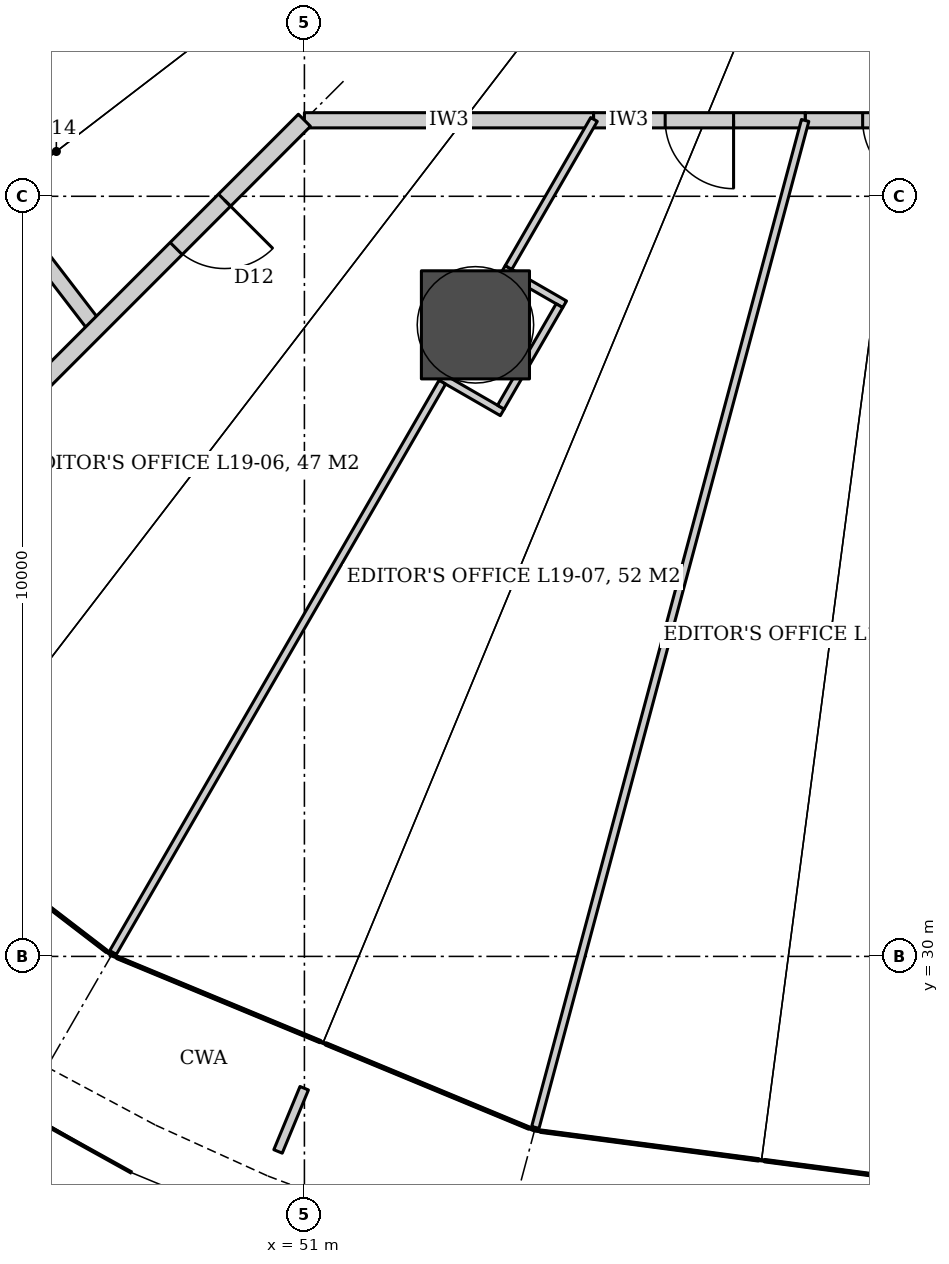
"""IFC4 building model, lengths in metres.
Left out: names, types, materials, properties, quantities, classifications, styles, units other than length and angle.
Written with IfcOpenShell. Run it as: python <this file> out.ifc"""

import sys

from ifc_helpers import new_model, si_unit, direction, frame, frame_2d, origin, origin_2d, place, context, subcontext, project, spatial, rectangle, hollow_circle, extrude, element, fill, save


model = new_model("IFC4")
c1 = context("Model", 3, precision=1e-05, world=origin(), true_north=direction((0.0, 1.0)))
c2 = subcontext(c1, "Body", "Model", "MODEL_VIEW")
j1 = project(units=[si_unit("LENGTHUNIT", "METRE"), si_unit("PLANEANGLEUNIT", "RADIAN")], contexts=[c1])
p1 = place(None, origin())
s1 = spatial("IfcSite", under=j1, at=p1, CompositionType="ELEMENT")
p2 = place(p1, origin())
s2 = spatial("IfcBuilding", under=s1, at=p2, CompositionType="ELEMENT")
p3 = place(p2, frame((0.0, 0.0, 80.6)))
s3 = spatial("IfcBuildingStorey", under=s2, at=p3, CompositionType="ELEMENT", Elevation=80.6)
p4 = place(p3, frame((53.25, 38.309, 0.0), z_axis=(0.0, 0.0, 1.0), x_axis=(1.0, 0.0, 0.0)))
e1 = element("IfcColumn", 1, at=p4, inside=s3, PredefinedType="COLUMN", context=c2, shape_type="SweptSolid", body=[
    extrude(hollow_circle(Radius=0.711, WallThickness=0.07, at=origin_2d()), origin(), (0.0, 0.0, 1.0), 4.2),
])
p5 = place(p3, frame((48.262, 38.262, 0.0), z_axis=(0.0, 0.0, 1.0), x_axis=(-0.60874374674, 0.79336690806, 0.0)))
e2 = element("IfcWall", 2, at=p5, inside=s3, PredefinedType="PARTITIONING", context=c2, shape_type="SweptSolid", body=[
    extrude(rectangle(XDim=4.333, YDim=0.2, at=frame_2d((2.167, 0.0))), origin(), (0.0, 0.0, 1.0), 3.04),
])
p6 = place(p5, frame((1.567, 0.0, 0.0)))
e3 = element("IfcOpeningElement", 3, at=p6, cuts=e2, PredefinedType="OPENING", context=c2, shape_type="SweptSolid", body=[
    extrude(rectangle(XDim=1.2, YDim=2.4, at=frame_2d((0.6, 1.2))), frame((0.0, 0.11, 0.0), z_axis=(0.0, -1.0, 0.0), x_axis=(1.0, 0.0, 0.0)), (0.0, 0.0, 1.0), 0.22),
])
p7 = place(p3, frame((60.0, 41.0, 0.0), z_axis=(0.0, 0.0, 1.0), x_axis=(-1.0, 0.0, 0.0)))
e4 = element("IfcWall", 4, at=p7, inside=s3, PredefinedType="PARTITIONING", context=c2, shape_type="SweptSolid", body=[
    extrude(rectangle(XDim=2.412, YDim=0.2, at=frame_2d((1.206, 0.0))), origin(), (0.0, 0.0, 1.0), 3.04),
])
p8 = place(p7, frame((0.756, 0.0, 0.0)))
e5 = element("IfcOpeningElement", 5, at=p8, cuts=e4, PredefinedType="OPENING", context=c2, shape_type="SweptSolid", body=[
    extrude(rectangle(XDim=0.9, YDim=2.4, at=frame_2d((0.45, 1.2))), frame((0.0, 0.11, 0.0), z_axis=(0.0, -1.0, 0.0), x_axis=(1.0, 0.0, 0.0)), (0.0, 0.0, 1.0), 0.22),
])
p9 = place(p3, frame((57.588, 41.0, 0.0), z_axis=(0.0, 0.0, 1.0), x_axis=(-1.0, 0.0, 0.0)))
e6 = element("IfcWall", 6, at=p9, inside=s3, PredefinedType="PARTITIONING", context=c2, shape_type="SweptSolid", body=[
    extrude(rectangle(XDim=2.785, YDim=0.2, at=frame_2d((1.392, 0.0))), origin(), (0.0, 0.0, 1.0), 3.04),
])
p10 = place(p9, frame((0.942, 0.0, 0.0)))
e7 = element("IfcOpeningElement", 7, at=p10, cuts=e6, PredefinedType="OPENING", context=c2, shape_type="SweptSolid", body=[
    extrude(rectangle(XDim=0.9, YDim=2.4, at=frame_2d((0.45, 1.2))), frame((0.0, 0.11, 0.0), z_axis=(0.0, -1.0, 0.0), x_axis=(1.0, 0.0, 0.0)), (0.0, 0.0, 1.0), 0.22),
])
p11 = place(p3, frame((54.804, 41.0, 0.0), z_axis=(0.0, 0.0, 1.0), x_axis=(-1.0, 0.0, 0.0)))
e8 = element("IfcWall", 8, at=p11, inside=s3, PredefinedType="PARTITIONING", context=c2, shape_type="SweptSolid", body=[
    extrude(rectangle(XDim=3.804, YDim=0.2, at=frame_2d((1.902, 0.0))), origin(), (0.0, 0.0, 1.0), 3.02),
])
p12 = place(p3, frame((51.0, 41.0, 0.0), z_axis=(0.0, 0.0, 1.0), x_axis=(-0.707106781187, -0.707106781187, 0.0)))
e9 = element("IfcWall", 9, at=p12, inside=s3, PredefinedType="PARTITIONING", context=c2, shape_type="SweptSolid", body=[
    extrude(rectangle(XDim=10.332, YDim=0.225, at=frame_2d((5.166, 0.0))), origin(), (0.0, 0.0, 1.0), 3.02),
])
p13 = place(p12, frame((1.486, 0.0, 0.0)))
e10 = element("IfcOpeningElement", 10, at=p13, cuts=e9, PredefinedType="OPENING", context=c2, shape_type="SweptSolid", body=[
    extrude(rectangle(XDim=0.9, YDim=2.4, at=frame_2d((0.45, 1.2))), frame((0.0, 0.123, 0.0), z_axis=(0.0, -1.0, 0.0), x_axis=(1.0, 0.0, 0.0)), (0.0, 0.0, 1.0), 0.245),
])
for number, where, z_axis, x_axis in (
    (11, (53.617, 39.045, 0.0), (0.0, 0.0, 1.0), (0.866, -0.5, 0.0)),
    (12, (52.796, 37.623, 0.0), (0.0, 0.0, 1.0), (0.866, -0.5, 0.0)),
):
    element("IfcWall", number, at=place(p3, frame(where, z_axis=z_axis, x_axis=x_axis)), inside=s3, PredefinedType="PARTITIONING", context=c2, shape_type="SweptSolid", body=[
        extrude(rectangle(XDim=0.931, YDim=0.1, at=frame_2d((0.466, 0.0))), origin(), (0.0, 0.0, 1.0), 3.02),
    ])
p14 = place(p3, frame((54.355, 38.561, 0.0), z_axis=(0.0, 0.0, 1.0), x_axis=(-0.50005597947, -0.86599308161, 0.0)))
e13 = element("IfcWall", 13, at=p14, inside=s3, PredefinedType="PARTITIONING", context=c2, shape_type="SweptSolid", body=[
    extrude(rectangle(XDim=1.542, YDim=0.1, at=frame_2d((0.771, 0.0))), origin(), (0.0, 0.0, 1.0), 3.02),
])
p15 = place(p3, frame((54.81, 41.011, 0.0), z_axis=(0.0, 0.0, 1.0), x_axis=(-0.499991822116, -0.866030125237, 0.0)))
e14 = element("IfcWall", 14, at=p15, inside=s3, PredefinedType="PARTITIONING", context=c2, shape_type="SweptSolid", body=[
    extrude(rectangle(XDim=2.249, YDim=0.1, at=frame_2d((1.125, 0.0))), origin(), (0.0, 0.0, 1.0), 3.04),
])
p16 = place(p3, frame((52.814, 37.554, 0.0), z_axis=(0.0, 0.0, 1.0), x_axis=(-0.500010270335, -0.866019474122, 0.0)))
e15 = element("IfcWall", 15, at=p16, inside=s3, PredefinedType="PARTITIONING", context=c2, shape_type="SweptSolid", body=[
    extrude(rectangle(XDim=8.689, YDim=0.1, at=frame_2d((4.344, 0.0))), origin(), (0.0, 0.0, 1.0), 3.04),
])
p17 = place(p3, frame((57.588, 40.998, 0.0), z_axis=(0.0, 0.0, 1.0), x_axis=(-0.258835854707, -0.965921322012, 0.0)))
e16 = element("IfcWall", 16, at=p17, inside=s3, PredefinedType="PARTITIONING", context=c2, shape_type="SweptSolid", body=[
    extrude(rectangle(XDim=13.74, YDim=0.1, at=frame_2d((6.87, 0.0))), origin(), (0.0, 0.0, 1.0), 3.02),
])
p18 = place(p13, origin())
e17 = element("IfcDoor", 17, at=p18, inside=s3, OperationType="SINGLE_SWING_LEFT", PredefinedType="DOOR", context=c2, shape_type="SweptSolid", body=[
    extrude(rectangle(XDim=0.9, YDim=2.4, at=frame_2d((0.45, 1.2))), frame((0.0, 0.025, 0.0), z_axis=(0.0, -1.0, 0.0), x_axis=(1.0, 0.0, 0.0)), (0.0, 0.0, 1.0), 0.05),
])
fill(e10, e17)
p19 = place(p10, origin())
e18 = element("IfcDoor", 18, at=p19, inside=s3, OperationType="SINGLE_SWING_LEFT", PredefinedType="DOOR", context=c2, shape_type="SweptSolid", body=[
    extrude(rectangle(XDim=0.9, YDim=2.4, at=frame_2d((0.45, 1.2))), frame((0.0, 0.025, 0.0), z_axis=(0.0, -1.0, 0.0), x_axis=(1.0, 0.0, 0.0)), (0.0, 0.0, 1.0), 0.05),
])
fill(e7, e18)
p20 = place(p8, origin())
e19 = element("IfcDoor", 19, at=p20, inside=s3, OperationType="SINGLE_SWING_LEFT", PredefinedType="DOOR", context=c2, shape_type="SweptSolid", body=[
    extrude(rectangle(XDim=0.9, YDim=2.4, at=frame_2d((0.45, 1.2))), frame((0.0, 0.025, 0.0), z_axis=(0.0, -1.0, 0.0), x_axis=(1.0, 0.0, 0.0)), (0.0, 0.0, 1.0), 0.05),
])
fill(e5, e19)
save(model, sys.argv[1])
